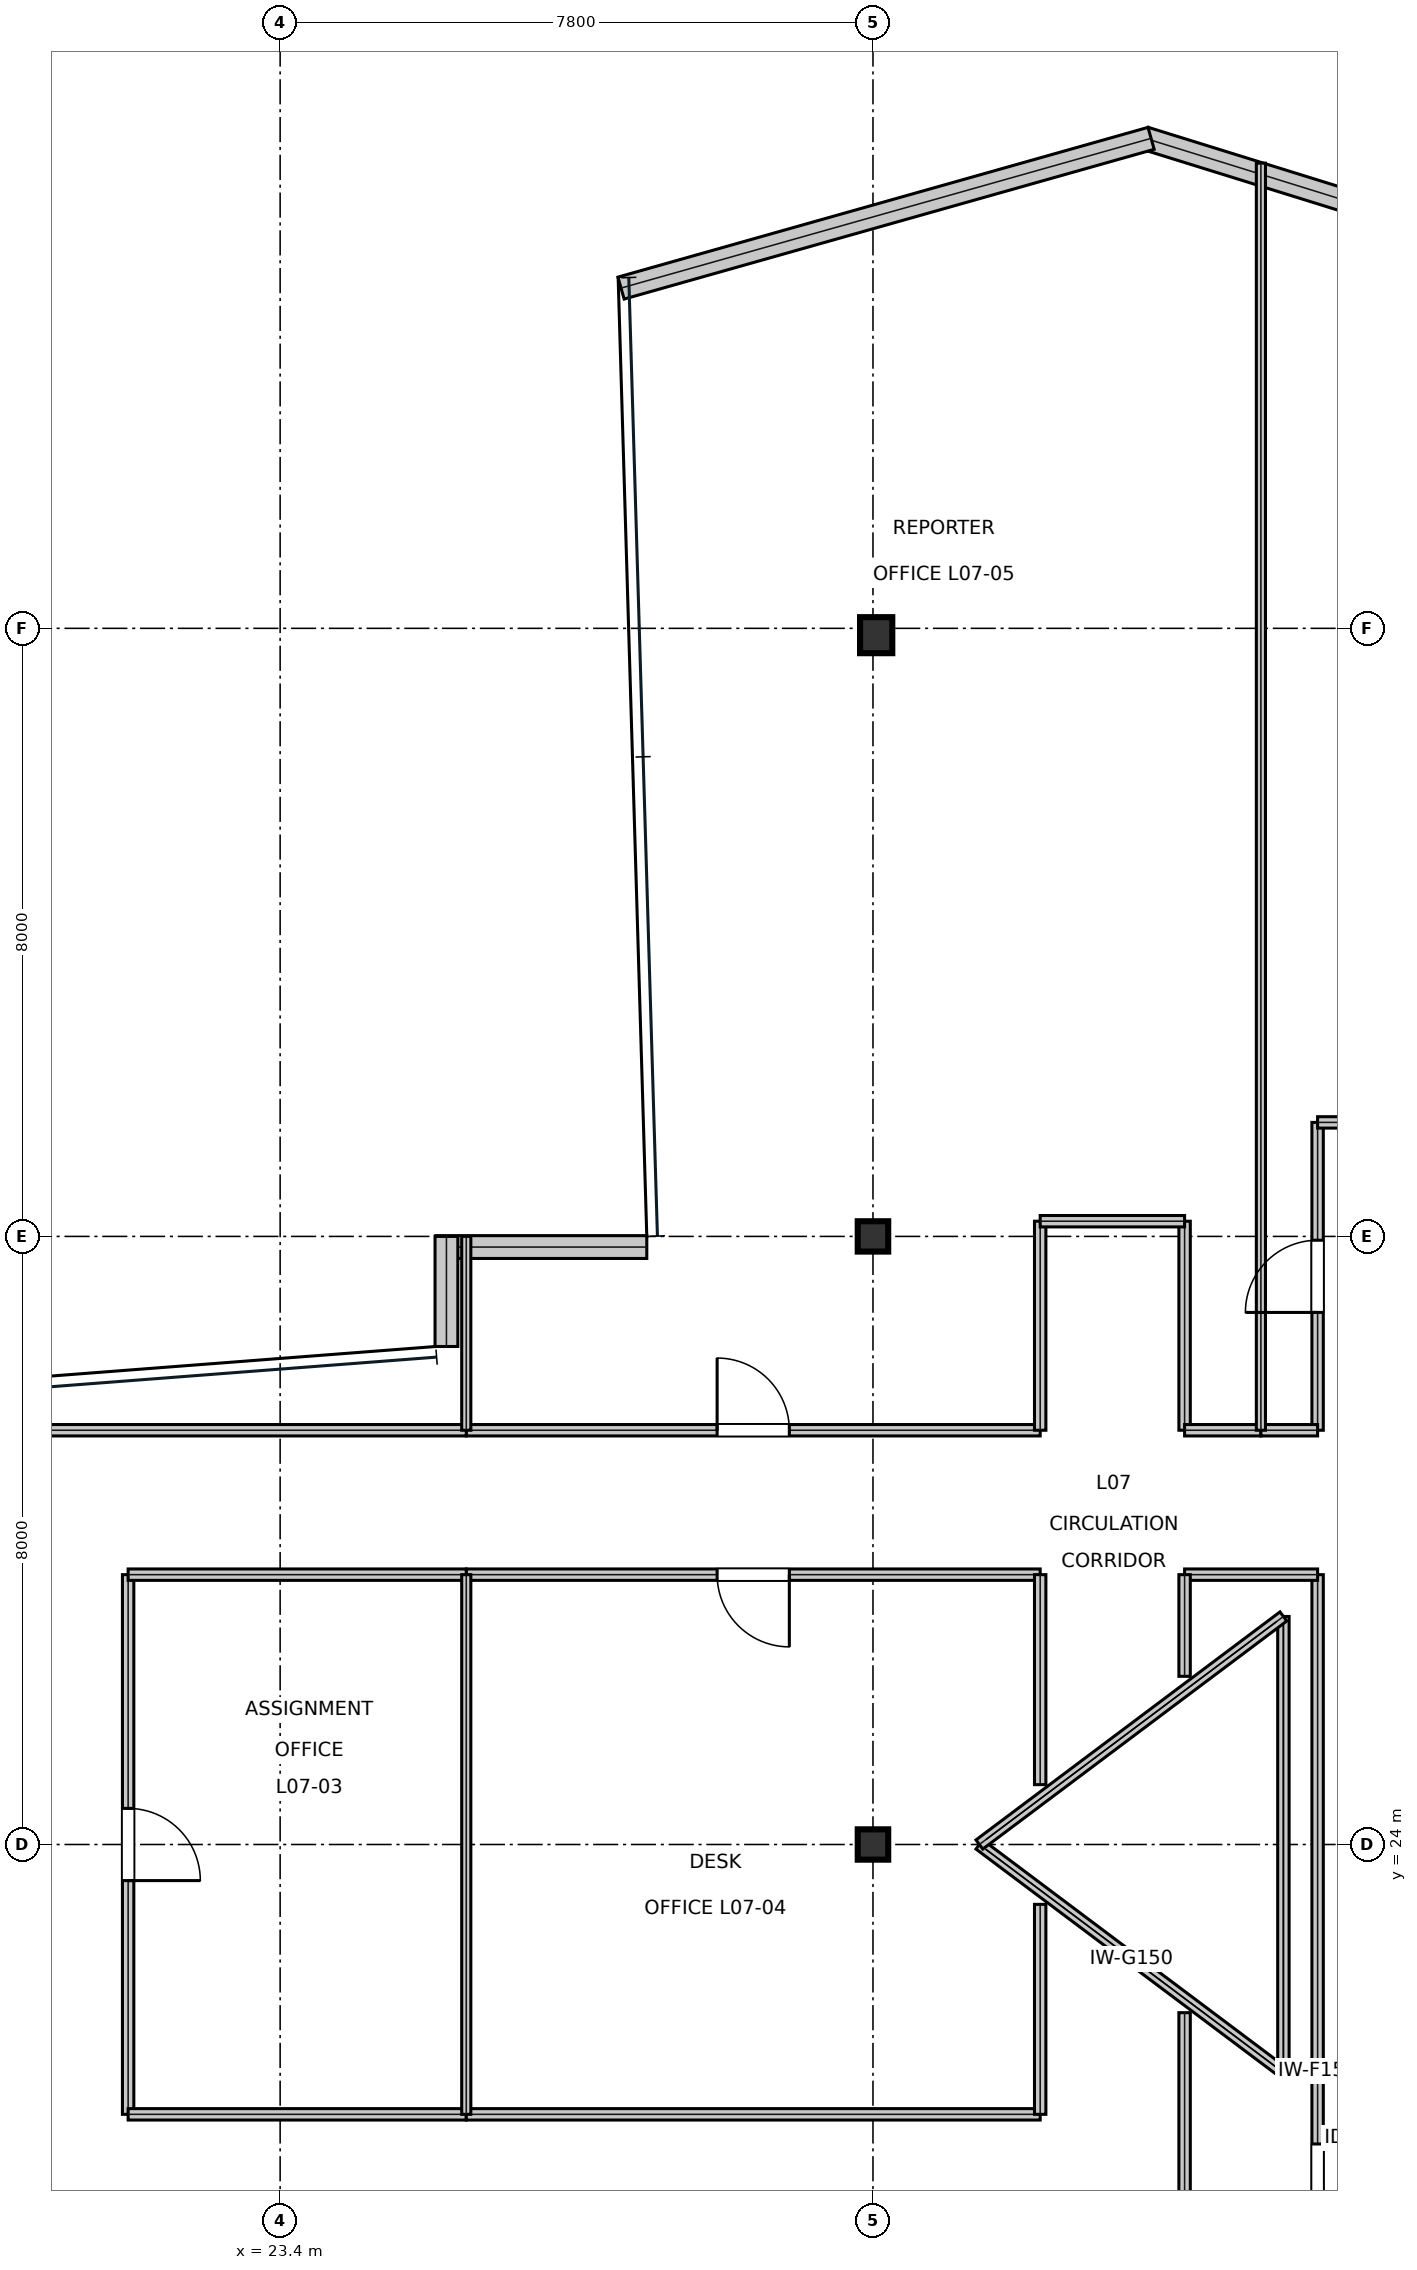
"""IFC4 building model, lengths in metres.
Left out: names, types, materials, properties, quantities, classifications, styles, units other than length and angle.
Written with IfcOpenShell. Run it as: python <this file> out.ifc"""

import sys

from ifc_helpers import new_model, si_unit, direction, frame, frame_2d, origin, origin_2d, place, context, subcontext, project, spatial, rectangle, i_section, extrude, element, fill, save


model = new_model("IFC4")
c1 = context("Model", 3, precision=1e-05, world=origin(), true_north=direction((0.0, 1.0)))
c2 = subcontext(c1, "Body", "Model", "MODEL_VIEW")
j1 = project(units=[si_unit("LENGTHUNIT", "METRE"), si_unit("PLANEANGLEUNIT", "RADIAN")], contexts=[c1])
p1 = place(None, origin())
s1 = spatial("IfcSite", under=j1, at=p1, CompositionType="ELEMENT")
p2 = place(p1, origin())
s2 = spatial("IfcBuilding", under=s1, at=p2, CompositionType="ELEMENT")
p3 = place(p2, frame((0.0, 0.0, 37.8)))
s3 = spatial("IfcBuildingStorey", under=s2, at=p3, CompositionType="ELEMENT", Elevation=37.8)
for number, where, z_axis, x_axis in (
    (1, (31.2, 24.0, 0.0), (0.0, 0.0, 1.0), (1.0, 0.0, 0.0)),
    (2, (31.2, 32.0, 0.0), (0.0, 0.0, 1.0), (1.0, 0.0, 0.0)),
):
    element("IfcColumn", number, at=place(p3, frame(where, z_axis=z_axis, x_axis=x_axis)), inside=s3, PredefinedType="COLUMN", context=c2, shape_type="SweptSolid", body=[
        extrude(i_section(OverallWidth=0.401, OverallDepth=0.399, WebThickness=0.025, FlangeThickness=0.04, at=origin_2d()), origin(), (0.0, 0.0, 1.0), 4.044),
    ])
p4 = place(p3, frame((31.242, 39.91, 0.016), z_axis=(0.0, 0.0, 1.0), x_axis=(1.0, 0.0, 0.0)))
e3 = element("IfcColumn", 3, at=p4, inside=s3, PredefinedType="COLUMN", context=c2, shape_type="SweptSolid", body=[
    extrude(i_section(OverallWidth=0.424, OverallDepth=0.474, WebThickness=0.048, FlangeThickness=0.077, at=origin_2d()), origin(), (0.0, 0.0, 1.0), 4.018),
])
p5 = place(p3, frame((41.753, 44.28, 0.0), z_axis=(0.0, 0.0, 1.0), x_axis=(-0.954957033511, 0.296744105498, 0.0)))
e4 = element("IfcWall", 4, at=p5, inside=s3, PredefinedType="STANDARD", context=c2, shape_type="SweptSolid", body=[
    extrude(rectangle(XDim=7.302, YDim=0.3, at=frame_2d((3.651, 0.0))), origin(), (0.0, 0.0, 1.0), 3.81),
])
p6 = place(p3, frame((34.859, 46.446, 0.0), z_axis=(0.0, 0.0, 1.0), x_axis=(-0.962339681863, -0.271849842212, 0.0)))
e5 = element("IfcWall", 5, at=p6, inside=s3, PredefinedType="STANDARD", context=c2, shape_type="SweptSolid", body=[
    extrude(rectangle(XDim=7.247, YDim=0.3, at=frame_2d((3.623, 0.0))), origin(), (0.0, 0.0, 1.0), 3.81),
])
p7 = place(p3, frame((28.224, 31.86, 0.0), z_axis=(0.0, 0.0, 1.0), x_axis=(-1.0, 0.0, 0.0)))
e6 = element("IfcWall", 6, at=p7, inside=s3, PredefinedType="STANDARD", context=c2, shape_type="SweptSolid", body=[
    extrude(rectangle(XDim=2.776, YDim=0.3, at=frame_2d((1.388, 0.0))), origin(), (0.0, 0.0, 1.0), 3.81),
])
p8 = place(p3, frame((25.588, 32.0, 0.0), z_axis=(0.0, 0.0, 1.0), x_axis=(0.0, -1.0, 0.0)))
e7 = element("IfcWall", 7, at=p8, inside=s3, PredefinedType="STANDARD", context=c2, shape_type="SweptSolid", body=[
    extrude(rectangle(XDim=1.448, YDim=0.3, at=frame_2d((0.724, 0.0))), origin(), (0.0, 0.0, 1.0), 3.338),
])
p9 = place(p3, frame((37.05, 14.5, 0.0), z_axis=(0.0, 0.0, 1.0), x_axis=(0.0, 1.0, 0.0)))
e8 = element("IfcWall", 8, at=p9, inside=s3, PredefinedType="PARTITIONING", context=c2, shape_type="SweptSolid", body=[
    extrude(rectangle(XDim=13.05, YDim=0.15, at=frame_2d((6.525, 0.0))), origin(), (0.0, 0.0, 1.0), 3.181),
])
p10 = place(p9, frame((4.61, 0.0, 0.0)))
e9 = element("IfcOpeningElement", 9, at=p10, cuts=e8, PredefinedType="OPENING", context=c2, shape_type="SweptSolid", body=[
    extrude(rectangle(XDim=0.95, YDim=2.15, at=frame_2d((0.475, 1.075))), frame((0.0, 0.085, 0.0), z_axis=(0.0, -1.0, 0.0), x_axis=(1.0, 0.0, 0.0)), (0.0, 0.0, 1.0), 0.17),
])
p11 = place(p3, frame((21.4, 20.45, 0.0), z_axis=(0.0, 0.0, 1.0), x_axis=(0.0, 1.0, 0.0)))
e10 = element("IfcWall", 10, at=p11, inside=s3, PredefinedType="PARTITIONING", context=c2, shape_type="SweptSolid", body=[
    extrude(rectangle(XDim=7.1, YDim=0.15, at=frame_2d((3.55, 0.0))), origin(), (0.0, 0.0, 1.0), 3.181),
])
p12 = place(p11, frame((3.075, 0.0, 0.0)))
e11 = element("IfcOpeningElement", 11, at=p12, cuts=e10, PredefinedType="OPENING", context=c2, shape_type="SweptSolid", body=[
    extrude(rectangle(XDim=0.95, YDim=2.15, at=frame_2d((0.475, 1.075))), frame((0.0, 0.085, 0.0), z_axis=(0.0, -1.0, 0.0), x_axis=(1.0, 0.0, 0.0)), (0.0, 0.0, 1.0), 0.17),
])
p13 = place(p3, frame((25.849, 27.55, 0.0), z_axis=(0.0, 0.0, 1.0), x_axis=(1.0, 0.0, 0.0)))
e12 = element("IfcWall", 12, at=p13, inside=s3, PredefinedType="PARTITIONING", context=c2, shape_type="SweptSolid", body=[
    extrude(rectangle(XDim=7.551, YDim=0.15, at=frame_2d((3.775, 0.0))), origin(), (0.0, 0.0, 1.0), 3.181),
])
p14 = place(p13, frame((3.301, 0.0, 0.0)))
e13 = element("IfcOpeningElement", 13, at=p14, cuts=e12, PredefinedType="OPENING", context=c2, shape_type="SweptSolid", body=[
    extrude(rectangle(XDim=0.95, YDim=2.15, at=frame_2d((0.475, 1.075))), frame((0.0, 0.085, 0.0), z_axis=(0.0, -1.0, 0.0), x_axis=(1.0, 0.0, 0.0)), (0.0, 0.0, 1.0), 0.17),
])
p15 = place(p3, frame((25.849, 29.45, 0.0), z_axis=(0.0, 0.0, 1.0), x_axis=(1.0, 0.0, 0.0)))
e14 = element("IfcWall", 14, at=p15, inside=s3, PredefinedType="PARTITIONING", context=c2, shape_type="SweptSolid", body=[
    extrude(rectangle(XDim=7.551, YDim=0.15, at=frame_2d((3.775, 0.0))), origin(), (0.0, 0.0, 1.0), 3.181),
])
p16 = place(p15, frame((3.301, 0.0, 0.0)))
e15 = element("IfcOpeningElement", 15, at=p16, cuts=e14, PredefinedType="OPENING", context=c2, shape_type="SweptSolid", body=[
    extrude(rectangle(XDim=0.95, YDim=2.15, at=frame_2d((0.475, 1.075))), frame((0.0, 0.085, 0.0), z_axis=(0.0, -1.0, 0.0), x_axis=(1.0, 0.0, 0.0)), (0.0, 0.0, 1.0), 0.17),
])
p17 = place(p3, frame((37.05, 29.45, 0.0), z_axis=(0.0, 0.0, 1.0), x_axis=(0.0, 1.0, 0.0)))
e16 = element("IfcWall", 16, at=p17, inside=s3, PredefinedType="PARTITIONING", context=c2, shape_type="SweptSolid", body=[
    extrude(rectangle(XDim=4.05, YDim=0.15, at=frame_2d((2.025, 0.0))), origin(), (0.0, 0.0, 1.0), 3.181),
])
p18 = place(p17, frame((1.55, 0.0, 0.0)))
e17 = element("IfcOpeningElement", 17, at=p18, cuts=e16, PredefinedType="OPENING", context=c2, shape_type="SweptSolid", body=[
    extrude(rectangle(XDim=0.95, YDim=2.15, at=frame_2d((0.475, 1.075))), frame((0.0, 0.085, 0.0), z_axis=(0.0, -1.0, 0.0), x_axis=(1.0, 0.0, 0.0)), (0.0, 0.0, 1.0), 0.17),
])
p19 = place(p3, frame((35.3, 15.8, 0.0), z_axis=(0.0, 0.0, 1.0), x_axis=(0.0, 1.0, 0.0)))
e18 = element("IfcWall", 18, at=p19, inside=s3, PredefinedType="PARTITIONING", context=c2, shape_type="SweptSolid", body=[
    extrude(rectangle(XDim=5.988, YDim=0.15, at=frame_2d((2.994, 0.0))), origin(), (0.0, 0.0, 1.0), 3.181),
])
p20 = place(p3, frame((35.3, 27.55, 0.0), z_axis=(0.0, 0.0, 1.0), x_axis=(1.0, 0.0, 0.0)))
e19 = element("IfcWall", 19, at=p20, inside=s3, PredefinedType="PARTITIONING", context=c2, shape_type="SweptSolid", body=[
    extrude(rectangle(XDim=1.75, YDim=0.15, at=frame_2d((0.875, 0.0))), origin(), (0.0, 0.0, 1.0), 3.391),
])
p21 = place(p3, frame((35.3, 26.212, 0.0), z_axis=(0.0, 0.0, 1.0), x_axis=(0.0, 1.0, 0.0)))
e20 = element("IfcWall", 20, at=p21, inside=s3, PredefinedType="PARTITIONING", context=c2, shape_type="SweptSolid", body=[
    extrude(rectangle(XDim=1.338, YDim=0.15, at=frame_2d((0.669, 0.0))), origin(), (0.0, 0.0, 1.0), 3.81),
])
p22 = place(p3, frame((14.0, 29.45, 0.0), z_axis=(0.0, 0.0, 1.0), x_axis=(1.0, 0.0, 0.0)))
e21 = element("IfcWall", 21, at=p22, inside=s3, PredefinedType="PARTITIONING", context=c2, shape_type="SweptSolid", body=[
    extrude(rectangle(XDim=11.849, YDim=0.15, at=frame_2d((5.925, 0.0))), origin(), (0.0, 0.0, 1.0), 3.338),
])
for number, where, z_axis, x_axis in (
    (22, (21.4, 27.55, 0.0), (0.0, 0.0, 1.0), (1.0, 0.0, 0.0)),
    (23, (21.4, 20.45, 0.0), (0.0, 0.0, 1.0), (1.0, 0.0, 0.0)),
):
    element("IfcWall", number, at=place(p3, frame(where, z_axis=z_axis, x_axis=x_axis)), inside=s3, PredefinedType="PARTITIONING", context=c2, shape_type="SweptSolid", body=[
        extrude(rectangle(XDim=4.449, YDim=0.15, at=frame_2d((2.225, 0.0))), origin(), (0.0, 0.0, 1.0), 3.391),
    ])
p23 = place(p3, frame((25.849, 20.45, 0.0), z_axis=(0.0, 0.0, 1.0), x_axis=(1.0, 0.0, 0.0)))
e24 = element("IfcWall", 24, at=p23, inside=s3, PredefinedType="PARTITIONING", context=c2, shape_type="SweptSolid", body=[
    extrude(rectangle(XDim=7.551, YDim=0.15, at=frame_2d((3.775, 0.0))), origin(), (0.0, 0.0, 1.0), 3.181),
])
for number, where, z_axis, x_axis in (
    (25, (33.4, 24.788, 0.0), (0.0, 0.0, 1.0), (0.0, 1.0, 0.0)),
    (26, (33.4, 20.45, 0.0), (0.0, 0.0, 1.0), (0.0, 1.0, 0.0)),
):
    element("IfcWall", number, at=place(p3, frame(where, z_axis=z_axis, x_axis=x_axis)), inside=s3, PredefinedType="PARTITIONING", context=c2, shape_type="SweptSolid", body=[
        extrude(rectangle(XDim=2.762, YDim=0.15, at=frame_2d((1.381, 0.0))), origin(), (0.0, 0.0, 1.0), 3.81),
    ])
for number, where, z_axis, x_axis in (
    (27, (33.4, 29.45, 0.0), (0.0, 0.0, 1.0), (0.0, 1.0, 0.0)),
    (28, (35.3, 29.45, 0.0), (0.0, 0.0, 1.0), (0.0, 1.0, 0.0)),
):
    element("IfcWall", number, at=place(p3, frame(where, z_axis=z_axis, x_axis=x_axis)), inside=s3, PredefinedType="PARTITIONING", context=c2, shape_type="SweptSolid", body=[
        extrude(rectangle(XDim=2.75, YDim=0.15, at=frame_2d((1.375, 0.0))), origin(), (0.0, 0.0, 1.0), 3.181),
    ])
p24 = place(p3, frame((33.4, 32.2, 0.0), z_axis=(0.0, 0.0, 1.0), x_axis=(1.0, 0.0, 0.0)))
e29 = element("IfcWall", 29, at=p24, inside=s3, PredefinedType="PARTITIONING", context=c2, shape_type="SweptSolid", body=[
    extrude(rectangle(XDim=1.9, YDim=0.15, at=frame_2d((0.95, 0.0))), origin(), (0.0, 0.0, 1.0), 3.181),
])
p25 = place(p3, frame((35.3, 29.45, 0.0), z_axis=(0.0, 0.0, 1.0), x_axis=(1.0, 0.0, 0.0)))
e30 = element("IfcWall", 30, at=p25, inside=s3, PredefinedType="PARTITIONING", context=c2, shape_type="SweptSolid", body=[
    extrude(rectangle(XDim=1.004, YDim=0.15, at=frame_2d((0.502, 0.0))), origin(), (0.0, 0.0, 1.0), 3.81),
])
p26 = place(p3, frame((37.05, 33.5, 0.0), z_axis=(0.0, 0.0, 1.0), x_axis=(1.0, 0.0, 0.0)))
e31 = element("IfcWall", 31, at=p26, inside=s3, PredefinedType="PARTITIONING", context=c2, shape_type="SweptSolid", body=[
    extrude(rectangle(XDim=1.9, YDim=0.15, at=frame_2d((0.95, 0.0))), origin(), (0.0, 0.0, 1.0), 3.81),
])
p27 = place(p3, frame((36.304, 29.45, 0.0), z_axis=(0.0, 0.0, 1.0), x_axis=(1.0, 0.0, 0.0)))
e32 = element("IfcWall", 32, at=p27, inside=s3, PredefinedType="PARTITIONING", context=c2, shape_type="SweptSolid", body=[
    extrude(rectangle(XDim=0.746, YDim=0.15, at=frame_2d((0.373, 0.0))), origin(), (0.0, 0.0, 1.0), 3.81),
])
p28 = place(p3, frame((25.849, 29.45, 0.0), z_axis=(0.0, 0.0, 1.0), x_axis=(0.0, 1.0, 0.0)))
e33 = element("IfcWall", 33, at=p28, inside=s3, PredefinedType="PARTITIONING", context=c2, shape_type="SweptSolid", body=[
    extrude(rectangle(XDim=2.55, YDim=0.12, at=frame_2d((1.275, 0.0))), origin(), (0.0, 0.0, 1.0), 3.338),
])
p29 = place(p3, frame((25.849, 20.45, 0.0), z_axis=(0.0, 0.0, 1.0), x_axis=(0.0, 1.0, 0.0)))
e34 = element("IfcWall", 34, at=p29, inside=s3, PredefinedType="PARTITIONING", context=c2, shape_type="SweptSolid", body=[
    extrude(rectangle(XDim=7.1, YDim=0.12, at=frame_2d((3.55, 0.0))), origin(), (0.0, 0.0, 1.0), 3.181),
])
p30 = place(p3, frame((36.304, 29.45, 0.0), z_axis=(0.0, 0.0, 1.0), x_axis=(0.0, 1.0, 0.0)))
e35 = element("IfcWall", 35, at=p30, inside=s3, PredefinedType="PARTITIONING", context=c2, shape_type="SweptSolid", body=[
    extrude(rectangle(XDim=16.67, YDim=0.12, at=frame_2d((8.335, 0.0))), origin(), (0.0, 0.0, 1.0), 3.181),
])
p31 = place(p3, frame((32.6, 24.0, 0.0), z_axis=(0.0, 0.0, 1.0), x_axis=(0.8, -0.6, 0.0)))
e36 = element("IfcWall", 36, at=p31, inside=s3, PredefinedType="MOVABLE", context=c2, shape_type="SweptSolid", body=[
    extrude(rectangle(XDim=5.0, YDim=0.15, at=frame_2d((2.5, 0.0))), origin(), (0.0, 0.0, 1.0), 3.81),
])
p32 = place(p3, frame((36.6, 21.0, 0.0), z_axis=(0.0, 0.0, 1.0), x_axis=(0.0, 1.0, 0.0)))
e37 = element("IfcWall", 37, at=p32, inside=s3, PredefinedType="MOVABLE", context=c2, shape_type="SweptSolid", body=[
    extrude(rectangle(XDim=6.0, YDim=0.15, at=frame_2d((3.0, 0.0))), origin(), (0.0, 0.0, 1.0), 3.81),
])
p33 = place(p3, frame((36.6, 27.0, 0.0), z_axis=(0.0, 0.0, 1.0), x_axis=(-0.8, -0.6, 0.0)))
e38 = element("IfcWall", 38, at=p33, inside=s3, PredefinedType="MOVABLE", context=c2, shape_type="SweptSolid", body=[
    extrude(rectangle(XDim=5.0, YDim=0.15, at=frame_2d((2.5, 0.0))), origin(), (0.0, 0.0, 1.0), 3.81),
])
p34 = place(p10, frame((0.95, 0.0, 0.0), z_axis=(0.0, 0.0, 1.0), x_axis=(-1.0, 0.0, 0.0)))
e39 = element("IfcDoor", 39, at=p34, inside=s3, OperationType="SINGLE_SWING_RIGHT", PredefinedType="DOOR", context=c2, shape_type="SweptSolid", body=[
    extrude(rectangle(XDim=0.95, YDim=2.15, at=frame_2d((0.475, 1.075))), frame((0.0, 0.025, 0.0), z_axis=(0.0, -1.0, 0.0), x_axis=(1.0, 0.0, 0.0)), (0.0, 0.0, 1.0), 0.05),
])
fill(e9, e39)
p35 = place(p12, frame((0.95, 0.0, 0.0), z_axis=(0.0, 0.0, 1.0), x_axis=(-1.0, 0.0, 0.0)))
e40 = element("IfcDoor", 40, at=p35, inside=s3, OperationType="SINGLE_SWING_RIGHT", PredefinedType="DOOR", context=c2, shape_type="SweptSolid", body=[
    extrude(rectangle(XDim=0.95, YDim=2.15, at=frame_2d((0.475, 1.075))), frame((0.0, 0.025, 0.0), z_axis=(0.0, -1.0, 0.0), x_axis=(1.0, 0.0, 0.0)), (0.0, 0.0, 1.0), 0.05),
])
fill(e11, e40)
p36 = place(p14, frame((0.95, 0.0, 0.0), z_axis=(0.0, 0.0, 1.0), x_axis=(-1.0, 0.0, 0.0)))
e41 = element("IfcDoor", 41, at=p36, inside=s3, OperationType="SINGLE_SWING_LEFT", PredefinedType="DOOR", context=c2, shape_type="SweptSolid", body=[
    extrude(rectangle(XDim=0.95, YDim=2.15, at=frame_2d((0.475, 1.075))), frame((0.0, 0.025, 0.0), z_axis=(0.0, -1.0, 0.0), x_axis=(1.0, 0.0, 0.0)), (0.0, 0.0, 1.0), 0.05),
])
fill(e13, e41)
p37 = place(p16, origin())
e42 = element("IfcDoor", 42, at=p37, inside=s3, OperationType="SINGLE_SWING_LEFT", PredefinedType="DOOR", context=c2, shape_type="SweptSolid", body=[
    extrude(rectangle(XDim=0.95, YDim=2.15, at=frame_2d((0.475, 1.075))), frame((0.0, 0.025, 0.0), z_axis=(0.0, -1.0, 0.0), x_axis=(1.0, 0.0, 0.0)), (0.0, 0.0, 1.0), 0.05),
])
fill(e15, e42)
p38 = place(p18, origin())
e43 = element("IfcDoor", 43, at=p38, inside=s3, OperationType="SINGLE_SWING_LEFT", PredefinedType="DOOR", context=c2, shape_type="SweptSolid", body=[
    extrude(rectangle(XDim=0.95, YDim=2.15, at=frame_2d((0.475, 1.075))), frame((0.0, 0.025, 0.0), z_axis=(0.0, -1.0, 0.0), x_axis=(1.0, 0.0, 0.0)), (0.0, 0.0, 1.0), 0.05),
])
fill(e17, e43)
save(model, sys.argv[1])
